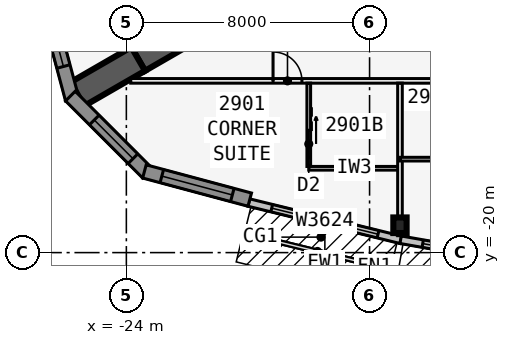
"""IFC4 building model, lengths in metres.
Left out: names, types, materials, properties, quantities, classifications, styles, units other than length and angle.
Written with IfcOpenShell. Run it as: python <this file> out.ifc"""

import sys

from ifc_helpers import new_model, si_unit, direction, frame, frame_2d, origin, origin_2d, place, context, subcontext, project, spatial, polyline, rectangle, i_section, outline, extrude, element, fill, save


model = new_model("IFC4")
c1 = context("Model", 3, precision=1e-05, world=origin(), true_north=direction((0.0, 1.0)))
c2 = subcontext(c1, "Body", "Model", "MODEL_VIEW")
j1 = project(units=[si_unit("LENGTHUNIT", "METRE"), si_unit("PLANEANGLEUNIT", "RADIAN")], contexts=[c1])
p1 = place(None, origin())
s1 = spatial("IfcSite", under=j1, at=p1, CompositionType="ELEMENT")
p2 = place(p1, origin())
s2 = spatial("IfcBuilding", under=s1, at=p2, CompositionType="ELEMENT")
p3 = place(p2, frame((0.0, 0.0, 114.7)))
s3 = spatial("IfcBuildingStorey", under=s2, at=p3, CompositionType="ELEMENT", Elevation=114.7)
for number, where, z_axis, x_axis in (
    (1, (-21.61, -12.477, 0.0), (0.0, 0.0, 1.0), (-0.866, -0.5, 0.0)),
    (2, (-23.61, -13.631, 0.0), (0.0, 0.0, 1.0), (-0.866, -0.5, 0.0)),
):
    element("IfcWall", number, at=place(p3, frame(where, z_axis=z_axis, x_axis=x_axis)), inside=s3, PredefinedType="SHEAR", context=c2, shape_type="SweptSolid", body=[
        extrude(rectangle(XDim=2.309, YDim=0.9, at=frame_2d((1.155, 0.0))), origin(), (0.0, 0.0, 1.0), 3.4),
    ])
p4 = place(p3, frame((-15.0, -19.1, 0.0), z_axis=(0.0, 0.0, 1.0), x_axis=(1.0, 0.0, 0.0)))
e3 = element("IfcColumn", 3, at=p4, inside=s3, PredefinedType="COLUMN", context=c2, shape_type="SweptSolid", body=[
    extrude(i_section(OverallWidth=0.437, OverallDepth=0.513, WebThickness=0.061, FlangeThickness=0.097, at=origin_2d()), origin(), (0.0, 0.0, 1.0), 3.4),
])
p5 = place(p3, frame((-19.97, -18.354, 0.0), z_axis=(0.0, 0.0, 1.0), x_axis=(0.971270024053, -0.237980126011, 0.0)))
e4 = element("IfcWall", 4, at=p5, inside=s3, PredefinedType="STANDARD", context=c2, shape_type="SweptSolid", body=[
    extrude(rectangle(XDim=5.148, YDim=0.25, at=frame_2d((2.574, 0.0))), origin(), (0.0, 0.0, 1.0), 3.235),
])
p6 = place(p5, frame((0.774, 0.0, 0.45)))
e5 = element("IfcOpeningElement", 5, at=p6, cuts=e4, PredefinedType="OPENING", context=c2, shape_type="SweptSolid", body=[
    extrude(rectangle(XDim=3.6, YDim=2.4, at=frame_2d((1.8, 1.2))), frame((0.0, 0.135, 0.0), z_axis=(0.0, -1.0, 0.0), x_axis=(1.0, 0.0, 0.0)), (0.0, 0.0, 1.0), 0.27),
])
p7 = place(p3, frame((-14.979, -19.577, 0.0), z_axis=(0.0, 0.0, 1.0), x_axis=(0.985030467156, -0.172380331752, 0.0)))
e6 = element("IfcWall", 6, at=p7, inside=s3, PredefinedType="STANDARD", context=c2, shape_type="SweptSolid", body=[
    extrude(rectangle(XDim=5.076, YDim=0.25, at=frame_2d((2.538, 0.0))), origin(), (0.0, 0.0, 1.0), 3.235),
])
p8 = place(p7, frame((0.738, 0.0, 0.45)))
e7 = element("IfcOpeningElement", 7, at=p8, cuts=e6, PredefinedType="OPENING", context=c2, shape_type="SweptSolid", body=[
    extrude(rectangle(XDim=3.6, YDim=2.4, at=frame_2d((1.8, 1.2))), frame((0.0, 0.135, 0.0), z_axis=(0.0, -1.0, 0.0), x_axis=(1.0, 0.0, 0.0)), (0.0, 0.0, 1.0), 0.27),
])
p9 = place(p3, frame((-26.711, -11.489, 0.0), z_axis=(0.0, 0.0, 1.0), x_axis=(0.258823421857, -0.965924653531, 0.0)))
e8 = element("IfcWall", 8, at=p9, inside=s3, PredefinedType="SOLIDWALL", context=c2, shape_type="SweptSolid", body=[
    extrude(outline(polyline([(3.586, 0.225), (3.527, 0.225), (3.035, 0.093), (3.0, 0.225), (0.0, 0.225), (0.0, -0.225), (3.586, -0.225), (3.586, 0.225)])), origin(), (0.0, 0.0, 1.0), 3.235),
])
p10 = place(p9, frame((0.675, 0.0, 0.45)))
e9 = element("IfcOpeningElement", 9, at=p10, cuts=e8, PredefinedType="OPENING", context=c2, shape_type="SweptSolid", body=[
    extrude(rectangle(XDim=1.8, YDim=2.4, at=frame_2d((0.9, 1.2))), frame((0.0, 0.235, 0.0), z_axis=(0.0, -1.0, 0.0), x_axis=(1.0, 0.0, 0.0)), (0.0, 0.0, 1.0), 0.47),
])
p11 = place(p3, frame((-25.841, -14.852, 0.0), z_axis=(0.0, 0.0, 1.0), x_axis=(0.707106781187, -0.707106781187, 0.0)))
e10 = element("IfcWall", 10, at=p11, inside=s3, PredefinedType="SOLIDWALL", context=c2, shape_type="SweptSolid", body=[
    extrude(outline(polyline([(3.586, 0.225), (0.586, 0.225), (0.551, 0.093), (0.059, 0.225), (0.0, 0.225), (0.0, -0.225), (3.586, -0.225), (3.586, 0.225)])), origin(), (0.0, 0.0, 1.0), 3.235),
])
p12 = place(p11, frame((1.111, 0.0, 0.45)))
e11 = element("IfcOpeningElement", 11, at=p12, cuts=e10, PredefinedType="OPENING", context=c2, shape_type="SweptSolid", body=[
    extrude(rectangle(XDim=1.8, YDim=2.4, at=frame_2d((0.9, 1.2))), frame((0.0, 0.235, 0.0), z_axis=(0.0, -1.0, 0.0), x_axis=(1.0, 0.0, 0.0)), (0.0, 0.0, 1.0), 0.47),
])
p13 = place(p3, frame((-23.406, -17.33, 0.0), z_axis=(0.0, 0.0, 1.0), x_axis=(0.965924653531, -0.258823421857, 0.0)))
e12 = element("IfcWall", 12, at=p13, inside=s3, PredefinedType="SOLIDWALL", context=c2, shape_type="SweptSolid", body=[
    extrude(rectangle(XDim=3.586, YDim=0.45, at=frame_2d((1.793, 0.0))), origin(), (0.0, 0.0, 1.0), 3.235),
])
p14 = place(p13, frame((0.593, 0.0, 0.45)))
e13 = element("IfcOpeningElement", 13, at=p14, cuts=e12, PredefinedType="OPENING", context=c2, shape_type="SweptSolid", body=[
    extrude(rectangle(XDim=2.4, YDim=2.4, at=frame_2d((1.2, 1.2))), frame((0.0, 0.235, 0.0), z_axis=(0.0, -1.0, 0.0), x_axis=(1.0, 0.0, 0.0)), (0.0, 0.0, 1.0), 0.47),
])
p15 = place(p3, frame((-23.857, -14.351, 0.0), z_axis=(0.0, 0.0, 1.0), x_axis=(1.0, 0.0, 0.0)))
e14 = element("IfcWall", 14, at=p15, inside=s3, PredefinedType="PARTITIONING", context=c2, shape_type="SweptSolid", body=[
    extrude(rectangle(XDim=47.714, YDim=0.15, at=frame_2d((23.857, 0.0))), origin(), (0.0, 0.0, 1.0), 3.235),
])
p16 = place(p15, frame((4.682, 0.0, 0.0)))
e15 = element("IfcOpeningElement", 15, at=p16, cuts=e14, PredefinedType="OPENING", context=c2, shape_type="SweptSolid", body=[
    extrude(rectangle(XDim=0.95, YDim=2.13, at=frame_2d((0.475, 1.065))), frame((0.0, 0.085, 0.0), z_axis=(0.0, -1.0, 0.0), x_axis=(1.0, 0.0, 0.0)), (0.0, 0.0, 1.0), 0.17),
])
p17 = place(p15, frame((11.482, 0.0, 0.0)))
e16 = element("IfcOpeningElement", 16, at=p17, cuts=e14, PredefinedType="OPENING", context=c2, shape_type="SweptSolid", body=[
    extrude(rectangle(XDim=0.95, YDim=2.13, at=frame_2d((0.475, 1.065))), frame((0.0, 0.085, 0.0), z_axis=(0.0, -1.0, 0.0), x_axis=(1.0, 0.0, 0.0)), (0.0, 0.0, 1.0), 0.17),
])
p18 = place(p15, frame((16.482, 0.0, 0.0)))
e17 = element("IfcOpeningElement", 17, at=p18, cuts=e14, PredefinedType="OPENING", context=c2, shape_type="SweptSolid", body=[
    extrude(rectangle(XDim=0.95, YDim=2.13, at=frame_2d((0.475, 1.065))), frame((0.0, 0.085, 0.0), z_axis=(0.0, -1.0, 0.0), x_axis=(1.0, 0.0, 0.0)), (0.0, 0.0, 1.0), 0.17),
])
p19 = place(p15, frame((21.482, 0.0, 0.0)))
e18 = element("IfcOpeningElement", 18, at=p19, cuts=e14, PredefinedType="OPENING", context=c2, shape_type="SweptSolid", body=[
    extrude(rectangle(XDim=0.95, YDim=2.13, at=frame_2d((0.475, 1.065))), frame((0.0, 0.085, 0.0), z_axis=(0.0, -1.0, 0.0), x_axis=(1.0, 0.0, 0.0)), (0.0, 0.0, 1.0), 0.17),
])
p20 = place(p15, frame((25.857, 0.0, 0.0)))
e19 = element("IfcOpeningElement", 19, at=p20, cuts=e14, PredefinedType="OPENING", context=c2, shape_type="SweptSolid", body=[
    extrude(rectangle(XDim=1.0, YDim=2.13, at=frame_2d((0.5, 1.065))), frame((0.0, 0.085, 0.0), z_axis=(0.0, -1.0, 0.0), x_axis=(1.0, 0.0, 0.0)), (0.0, 0.0, 1.0), 0.17),
])
p21 = place(p15, frame((32.082, 0.0, 0.0)))
e20 = element("IfcOpeningElement", 20, at=p21, cuts=e14, PredefinedType="OPENING", context=c2, shape_type="SweptSolid", body=[
    extrude(rectangle(XDim=0.95, YDim=2.13, at=frame_2d((0.475, 1.065))), frame((0.0, 0.085, 0.0), z_axis=(0.0, -1.0, 0.0), x_axis=(1.0, 0.0, 0.0)), (0.0, 0.0, 1.0), 0.17),
])
p22 = place(p15, frame((42.082, 0.0, 0.0)))
e21 = element("IfcOpeningElement", 21, at=p22, cuts=e14, PredefinedType="OPENING", context=c2, shape_type="SweptSolid", body=[
    extrude(rectangle(XDim=0.95, YDim=2.13, at=frame_2d((0.475, 1.065))), frame((0.0, 0.085, 0.0), z_axis=(0.0, -1.0, 0.0), x_axis=(1.0, 0.0, 0.0)), (0.0, 0.0, 1.0), 0.17),
])
p23 = place(p3, frame((-15.0, -14.426, 0.0), z_axis=(0.0, 0.0, 1.0), x_axis=(0.0, -1.0, 0.0)))
e22 = element("IfcWall", 22, at=p23, inside=s3, PredefinedType="PARTITIONING", context=c2, shape_type="SweptSolid", body=[
    extrude(rectangle(XDim=5.017, YDim=0.15, at=frame_2d((2.508, 0.0))), origin(), (0.0, 0.0, 1.0), 2.389),
])
p24 = place(p3, frame((-18.0, -17.226, 0.0), z_axis=(0.0, 0.0, 1.0), x_axis=(1.0, 0.0, 0.0)))
e23 = element("IfcWall", 23, at=p24, inside=s3, PredefinedType="PLUMBINGWALL", context=c2, shape_type="SweptSolid", body=[
    extrude(rectangle(XDim=3.0, YDim=0.12, at=frame_2d((1.5, 0.0))), origin(), (0.0, 0.0, 1.0), 3.235),
])
p25 = place(p3, frame((-18.0, -14.426, 0.0), z_axis=(0.0, 0.0, 1.0), x_axis=(0.0, -1.0, 0.0)))
e24 = element("IfcWall", 24, at=p25, inside=s3, PredefinedType="PLUMBINGWALL", context=c2, shape_type="SweptSolid", body=[
    extrude(rectangle(XDim=2.74, YDim=0.12, at=frame_2d((1.37, 0.0))), origin(), (0.0, 0.0, 1.0), 3.235),
])
p26 = place(p25, frame((1.55, 0.0, 0.0)))
e25 = element("IfcOpeningElement", 25, at=p26, cuts=e24, PredefinedType="OPENING", context=c2, shape_type="SweptSolid", body=[
    extrude(rectangle(XDim=0.9, YDim=2.13, at=frame_2d((0.45, 1.065))), frame((0.0, 0.07, 0.0), z_axis=(0.0, -1.0, 0.0), x_axis=(1.0, 0.0, 0.0)), (0.0, 0.0, 1.0), 0.14),
])
p27 = place(p3, frame((-15.0, -16.926, 0.0), z_axis=(0.0, 0.0, 1.0), x_axis=(1.0, 0.0, 0.0)))
e26 = element("IfcWall", 26, at=p27, inside=s3, PredefinedType="PLUMBINGWALL", context=c2, shape_type="SweptSolid", body=[
    extrude(rectangle(XDim=2.4, YDim=0.12, at=frame_2d((1.2, 0.0))), origin(), (0.0, 0.0, 1.0), 3.235),
])
p28 = place(p6, origin())
e27 = element("IfcWindow", 27, at=p28, inside=s3, PartitioningType="SINGLE_PANEL", PredefinedType="WINDOW", context=c2, shape_type="SweptSolid", body=[
    extrude(rectangle(XDim=3.6, YDim=2.4, at=frame_2d((1.8, 1.2))), frame((0.0, 0.03, 0.0), z_axis=(0.0, -1.0, 0.0), x_axis=(1.0, 0.0, 0.0)), (0.0, 0.0, 1.0), 0.06),
])
fill(e5, e27)
p29 = place(p8, origin())
e28 = element("IfcWindow", 28, at=p29, inside=s3, PartitioningType="SINGLE_PANEL", PredefinedType="WINDOW", context=c2, shape_type="SweptSolid", body=[
    extrude(rectangle(XDim=3.6, YDim=2.4, at=frame_2d((1.8, 1.2))), frame((0.0, 0.03, 0.0), z_axis=(0.0, -1.0, 0.0), x_axis=(1.0, 0.0, 0.0)), (0.0, 0.0, 1.0), 0.06),
])
fill(e7, e28)
p30 = place(p10, origin())
e29 = element("IfcWindow", 29, at=p30, inside=s3, PartitioningType="SINGLE_PANEL", PredefinedType="WINDOW", context=c2, shape_type="SweptSolid", body=[
    extrude(rectangle(XDim=1.8, YDim=2.4, at=frame_2d((0.9, 1.2))), frame((0.0, 0.03, 0.0), z_axis=(0.0, -1.0, 0.0), x_axis=(1.0, 0.0, 0.0)), (0.0, 0.0, 1.0), 0.06),
])
fill(e9, e29)
p31 = place(p12, origin())
e30 = element("IfcWindow", 30, at=p31, inside=s3, PartitioningType="SINGLE_PANEL", PredefinedType="WINDOW", context=c2, shape_type="SweptSolid", body=[
    extrude(rectangle(XDim=1.8, YDim=2.4, at=frame_2d((0.9, 1.2))), frame((0.0, 0.03, 0.0), z_axis=(0.0, -1.0, 0.0), x_axis=(1.0, 0.0, 0.0)), (0.0, 0.0, 1.0), 0.06),
])
fill(e11, e30)
p32 = place(p14, origin())
e31 = element("IfcWindow", 31, at=p32, inside=s3, PartitioningType="SINGLE_PANEL", PredefinedType="WINDOW", context=c2, shape_type="SweptSolid", body=[
    extrude(rectangle(XDim=2.4, YDim=2.4, at=frame_2d((1.2, 1.2))), frame((0.0, 0.03, 0.0), z_axis=(0.0, -1.0, 0.0), x_axis=(1.0, 0.0, 0.0)), (0.0, 0.0, 1.0), 0.06),
])
fill(e13, e31)
p33 = place(p26, origin())
e32 = element("IfcDoor", 32, at=p33, inside=s3, OperationType="SLIDING_TO_LEFT", PredefinedType="DOOR", context=c2, shape_type="SweptSolid", body=[
    extrude(rectangle(XDim=0.9, YDim=2.13, at=frame_2d((0.45, 1.065))), frame((0.0, 0.025, 0.0), z_axis=(0.0, -1.0, 0.0), x_axis=(1.0, 0.0, 0.0)), (0.0, 0.0, 1.0), 0.05),
])
fill(e25, e32)
p34 = place(p16, origin())
e33 = element("IfcDoor", 33, at=p34, inside=s3, OperationType="SINGLE_SWING_LEFT", PredefinedType="DOOR", context=c2, shape_type="SweptSolid", body=[
    extrude(rectangle(XDim=0.95, YDim=2.13, at=frame_2d((0.475, 1.065))), frame((0.0, 0.025, 0.0), z_axis=(0.0, -1.0, 0.0), x_axis=(1.0, 0.0, 0.0)), (0.0, 0.0, 1.0), 0.05),
])
fill(e15, e33)
save(model, sys.argv[1])
